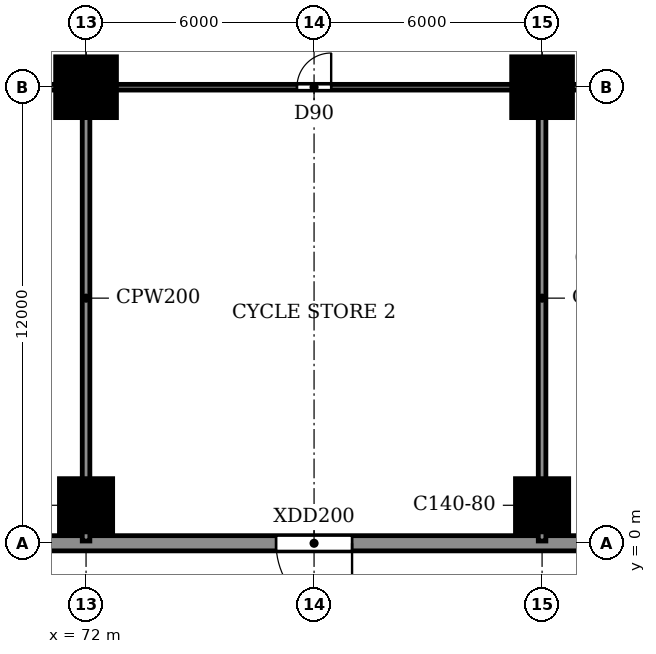
"""IFC4 building model, lengths in metres.
Left out: names, types, materials, properties, quantities, classifications, styles, units other than length and angle.
Written with IfcOpenShell. Run it as: python <this file> out.ifc"""

import sys

from ifc_helpers import new_model, si_unit, direction, frame, frame_2d, origin, origin_2d, place, context, subcontext, project, spatial, rectangle, extrude, source, transform, mapped, element, fill, save


model = new_model("IFC4")
c1 = context("Model", 3, precision=1e-05, world=origin(), true_north=direction((0.0, 1.0)))
c2 = subcontext(c1, "Body", "Model", "MODEL_VIEW")
j1 = project(units=[si_unit("LENGTHUNIT", "METRE"), si_unit("PLANEANGLEUNIT", "RADIAN")], contexts=[c1])
p1 = place(None, origin())
s1 = spatial("IfcSite", under=j1, at=p1, CompositionType="ELEMENT")
p2 = place(p1, origin())
s2 = spatial("IfcBuilding", under=s1, at=p2, CompositionType="ELEMENT")
p3 = place(p2, origin())
s3 = spatial("IfcBuildingStorey", under=s2, at=p3, CompositionType="ELEMENT", Elevation=0.0)
m1 = source(origin(), c2, "Body", "SweptSolid", [
    extrude(rectangle(XDim=1.4, YDim=1.4, at=origin_2d()), origin(), (0.0, 0.0, 1.0), 4.5),
])
p4 = place(p3, frame((72.0, 1.0, -0.3), z_axis=(0.0, 0.0, 1.0), x_axis=(1.0, 0.0, 0.0)))
e1 = element("IfcColumn", 1, at=p4, inside=s3, PredefinedType="COLUMN", context=c2, shape_type="MappedRepresentation", body=[
    mapped(m1, transform((0.0, 0.0, 0.0))),
])
m2 = source(origin(), c2, "Body", "SweptSolid", [
    extrude(rectangle(XDim=1.6, YDim=1.6, at=origin_2d()), origin(), (0.0, 0.0, 1.0), 4.5),
])
p5 = place(p3, frame((72.0, 12.0, -0.3), z_axis=(0.0, 0.0, 1.0), x_axis=(1.0, 0.0, 0.0)))
e2 = element("IfcColumn", 2, at=p5, inside=s3, PredefinedType="COLUMN", context=c2, shape_type="MappedRepresentation", body=[
    mapped(m2, transform((0.0, 0.0, 0.0))),
])
p6 = place(p3, frame((84.0, 1.0, -0.3), z_axis=(0.0, 0.0, 1.0), x_axis=(1.0, 0.0, 0.0)))
e3 = element("IfcColumn", 3, at=p6, inside=s3, PredefinedType="COLUMN", context=c2, shape_type="MappedRepresentation", body=[
    mapped(m1, transform((0.0, 0.0, 0.0))),
])
p7 = place(p3, frame((84.0, 12.0, -0.3), z_axis=(0.0, 0.0, 1.0), x_axis=(1.0, 0.0, 0.0)))
e4 = element("IfcColumn", 4, at=p7, inside=s3, PredefinedType="COLUMN", context=c2, shape_type="MappedRepresentation", body=[
    mapped(m2, transform((0.0, 0.0, 0.0))),
])
p8 = place(p3, frame((-0.2, 0.0, 0.0), z_axis=(0.0, 0.0, 1.0), x_axis=(1.0, 0.0, 0.0)))
e5 = element("IfcWall", 5, at=p8, inside=s3, PredefinedType="STANDARD", context=c2, shape_type="SweptSolid", body=[
    extrude(rectangle(XDim=102.4, YDim=0.4, at=frame_2d((51.2, 0.0))), origin(), (0.0, 0.0, 1.0), 4.2),
])
p9 = place(p8, frame((13.6, 0.0, 0.0)))
e6 = element("IfcOpeningElement", 6, at=p9, cuts=e5, PredefinedType="OPENING", context=c2, shape_type="SweptSolid", body=[
    extrude(rectangle(XDim=2.0, YDim=2.4, at=frame_2d((1.0, 1.2))), frame((0.0, 0.21, 0.0), z_axis=(0.0, -1.0, 0.0), x_axis=(1.0, 0.0, 0.0)), (0.0, 0.0, 1.0), 0.42),
])
p10 = place(p8, frame((43.2, 0.0, 0.0)))
e7 = element("IfcOpeningElement", 7, at=p10, cuts=e5, PredefinedType="OPENING", context=c2, shape_type="SweptSolid", body=[
    extrude(rectangle(XDim=1.0, YDim=2.1, at=frame_2d((0.5, 1.05))), frame((0.0, 0.21, 0.0), z_axis=(0.0, -1.0, 0.0), x_axis=(1.0, 0.0, 0.0)), (0.0, 0.0, 1.0), 0.42),
])
p11 = place(p8, frame((49.6, 0.0, 0.0)))
e8 = element("IfcOpeningElement", 8, at=p11, cuts=e5, PredefinedType="OPENING", context=c2, shape_type="SweptSolid", body=[
    extrude(rectangle(XDim=2.0, YDim=2.4, at=frame_2d((1.0, 1.2))), frame((0.0, 0.21, 0.0), z_axis=(0.0, -1.0, 0.0), x_axis=(1.0, 0.0, 0.0)), (0.0, 0.0, 1.0), 0.42),
])
p12 = place(p8, frame((55.2, 0.0, 0.0)))
e9 = element("IfcOpeningElement", 9, at=p12, cuts=e5, PredefinedType="OPENING", context=c2, shape_type="SweptSolid", body=[
    extrude(rectangle(XDim=1.0, YDim=2.1, at=frame_2d((0.5, 1.05))), frame((0.0, 0.21, 0.0), z_axis=(0.0, -1.0, 0.0), x_axis=(1.0, 0.0, 0.0)), (0.0, 0.0, 1.0), 0.42),
])
p13 = place(p8, frame((65.2, 0.0, 0.0)))
e10 = element("IfcOpeningElement", 10, at=p13, cuts=e5, PredefinedType="OPENING", context=c2, shape_type="SweptSolid", body=[
    extrude(rectangle(XDim=2.0, YDim=2.4, at=frame_2d((1.0, 1.2))), frame((0.0, 0.21, 0.0), z_axis=(0.0, -1.0, 0.0), x_axis=(1.0, 0.0, 0.0)), (0.0, 0.0, 1.0), 0.42),
])
p14 = place(p8, frame((77.2, 0.0, 0.0)))
e11 = element("IfcOpeningElement", 11, at=p14, cuts=e5, PredefinedType="OPENING", context=c2, shape_type="SweptSolid", body=[
    extrude(rectangle(XDim=2.0, YDim=2.4, at=frame_2d((1.0, 1.2))), frame((0.0, 0.21, 0.0), z_axis=(0.0, -1.0, 0.0), x_axis=(1.0, 0.0, 0.0)), (0.0, 0.0, 1.0), 0.42),
])
p15 = place(p8, frame((86.2, 0.0, 0.0)))
e12 = element("IfcOpeningElement", 12, at=p15, cuts=e5, PredefinedType="OPENING", context=c2, shape_type="SweptSolid", body=[
    extrude(rectangle(XDim=2.0, YDim=2.4, at=frame_2d((1.0, 1.2))), frame((0.0, 0.21, 0.0), z_axis=(0.0, -1.0, 0.0), x_axis=(1.0, 0.0, 0.0)), (0.0, 0.0, 1.0), 0.42),
])
p16 = place(p8, frame((90.7, 0.0, 0.0)))
e13 = element("IfcOpeningElement", 13, at=p16, cuts=e5, PredefinedType="OPENING", context=c2, shape_type="SweptSolid", body=[
    extrude(rectangle(XDim=2.0, YDim=2.4, at=frame_2d((1.0, 1.2))), frame((0.0, 0.21, 0.0), z_axis=(0.0, -1.0, 0.0), x_axis=(1.0, 0.0, 0.0)), (0.0, 0.0, 1.0), 0.42),
])
p17 = place(p8, frame((98.2, 0.0, 0.0)))
e14 = element("IfcOpeningElement", 14, at=p17, cuts=e5, PredefinedType="OPENING", context=c2, shape_type="SweptSolid", body=[
    extrude(rectangle(XDim=2.0, YDim=2.4, at=frame_2d((1.0, 1.2))), frame((0.0, 0.21, 0.0), z_axis=(0.0, -1.0, 0.0), x_axis=(1.0, 0.0, 0.0)), (0.0, 0.0, 1.0), 0.42),
])
p18 = place(p3, frame((38.9, 12.0, 0.0), z_axis=(0.0, 0.0, 1.0), x_axis=(1.0, 0.0, 0.0)))
e15 = element("IfcWall", 15, at=p18, inside=s3, PredefinedType="PARTITIONING", context=c2, shape_type="SweptSolid", body=[
    extrude(rectangle(XDim=63.1, YDim=0.15, at=frame_2d((31.55, 0.0))), origin(), (0.0, 0.0, 1.0), 4.2),
])
p19 = place(p18, frame((10.2, 0.0, 0.0)))
e16 = element("IfcOpeningElement", 16, at=p19, cuts=e15, PredefinedType="OPENING", context=c2, shape_type="SweptSolid", body=[
    extrude(rectangle(XDim=1.8, YDim=2.1, at=frame_2d((0.9, 1.05))), frame((0.0, 0.085, 0.0), z_axis=(0.0, -1.0, 0.0), x_axis=(1.0, 0.0, 0.0)), (0.0, 0.0, 1.0), 0.17),
])
p20 = place(p18, frame((23.65, 0.0, 0.0)))
e17 = element("IfcOpeningElement", 17, at=p20, cuts=e15, PredefinedType="OPENING", context=c2, shape_type="SweptSolid", body=[
    extrude(rectangle(XDim=0.9, YDim=2.1, at=frame_2d((0.45, 1.05))), frame((0.0, 0.085, 0.0), z_axis=(0.0, -1.0, 0.0), x_axis=(1.0, 0.0, 0.0)), (0.0, 0.0, 1.0), 0.17),
])
p21 = place(p18, frame((38.65, 0.0, 0.0)))
e18 = element("IfcOpeningElement", 18, at=p21, cuts=e15, PredefinedType="OPENING", context=c2, shape_type="SweptSolid", body=[
    extrude(rectangle(XDim=0.9, YDim=2.1, at=frame_2d((0.45, 1.05))), frame((0.0, 0.085, 0.0), z_axis=(0.0, -1.0, 0.0), x_axis=(1.0, 0.0, 0.0)), (0.0, 0.0, 1.0), 0.17),
])
p22 = place(p18, frame((51.7, 0.0, 0.0)))
e19 = element("IfcOpeningElement", 19, at=p22, cuts=e15, PredefinedType="OPENING", context=c2, shape_type="SweptSolid", body=[
    extrude(rectangle(XDim=1.8, YDim=2.1, at=frame_2d((0.9, 1.05))), frame((0.0, 0.085, 0.0), z_axis=(0.0, -1.0, 0.0), x_axis=(1.0, 0.0, 0.0)), (0.0, 0.0, 1.0), 0.17),
])
for number, where, z_axis, x_axis in (
    (20, (72.0, 0.06, 0.0), (0.0, 0.0, 1.0), (0.0, 1.0, 0.0)),
    (21, (84.0, 0.06, 0.0), (0.0, 0.0, 1.0), (0.0, 1.0, 0.0)),
):
    element("IfcWall", number, at=place(p3, frame(where, z_axis=z_axis, x_axis=x_axis)), inside=s3, PredefinedType="PARTITIONING", context=c2, shape_type="SweptSolid", body=[
        extrude(rectangle(XDim=11.865, YDim=0.2, at=frame_2d((5.933, 0.0))), origin(), (0.0, 0.0, 1.0), 4.2),
    ])
p23 = place(p14, frame((2.0, 0.0, 0.0), z_axis=(0.0, 0.0, 1.0), x_axis=(-1.0, 0.0, 0.0)))
e22 = element("IfcDoor", 22, at=p23, inside=s3, OperationType="DOUBLE_DOOR_SINGLE_SWING", PredefinedType="DOOR", context=c2, shape_type="SweptSolid", body=[
    extrude(rectangle(XDim=2.0, YDim=2.4, at=frame_2d((1.0, 1.2))), frame((0.0, 0.025, 0.0), z_axis=(0.0, -1.0, 0.0), x_axis=(1.0, 0.0, 0.0)), (0.0, 0.0, 1.0), 0.05),
])
fill(e11, e22)
p24 = place(p21, origin())
e23 = element("IfcDoor", 23, at=p24, inside=s3, OperationType="SINGLE_SWING_RIGHT", PredefinedType="DOOR", context=c2, shape_type="SweptSolid", body=[
    extrude(rectangle(XDim=0.9, YDim=2.1, at=frame_2d((0.45, 1.05))), frame((0.0, 0.025, 0.0), z_axis=(0.0, -1.0, 0.0), x_axis=(1.0, 0.0, 0.0)), (0.0, 0.0, 1.0), 0.05),
])
fill(e18, e23)
save(model, sys.argv[1])
